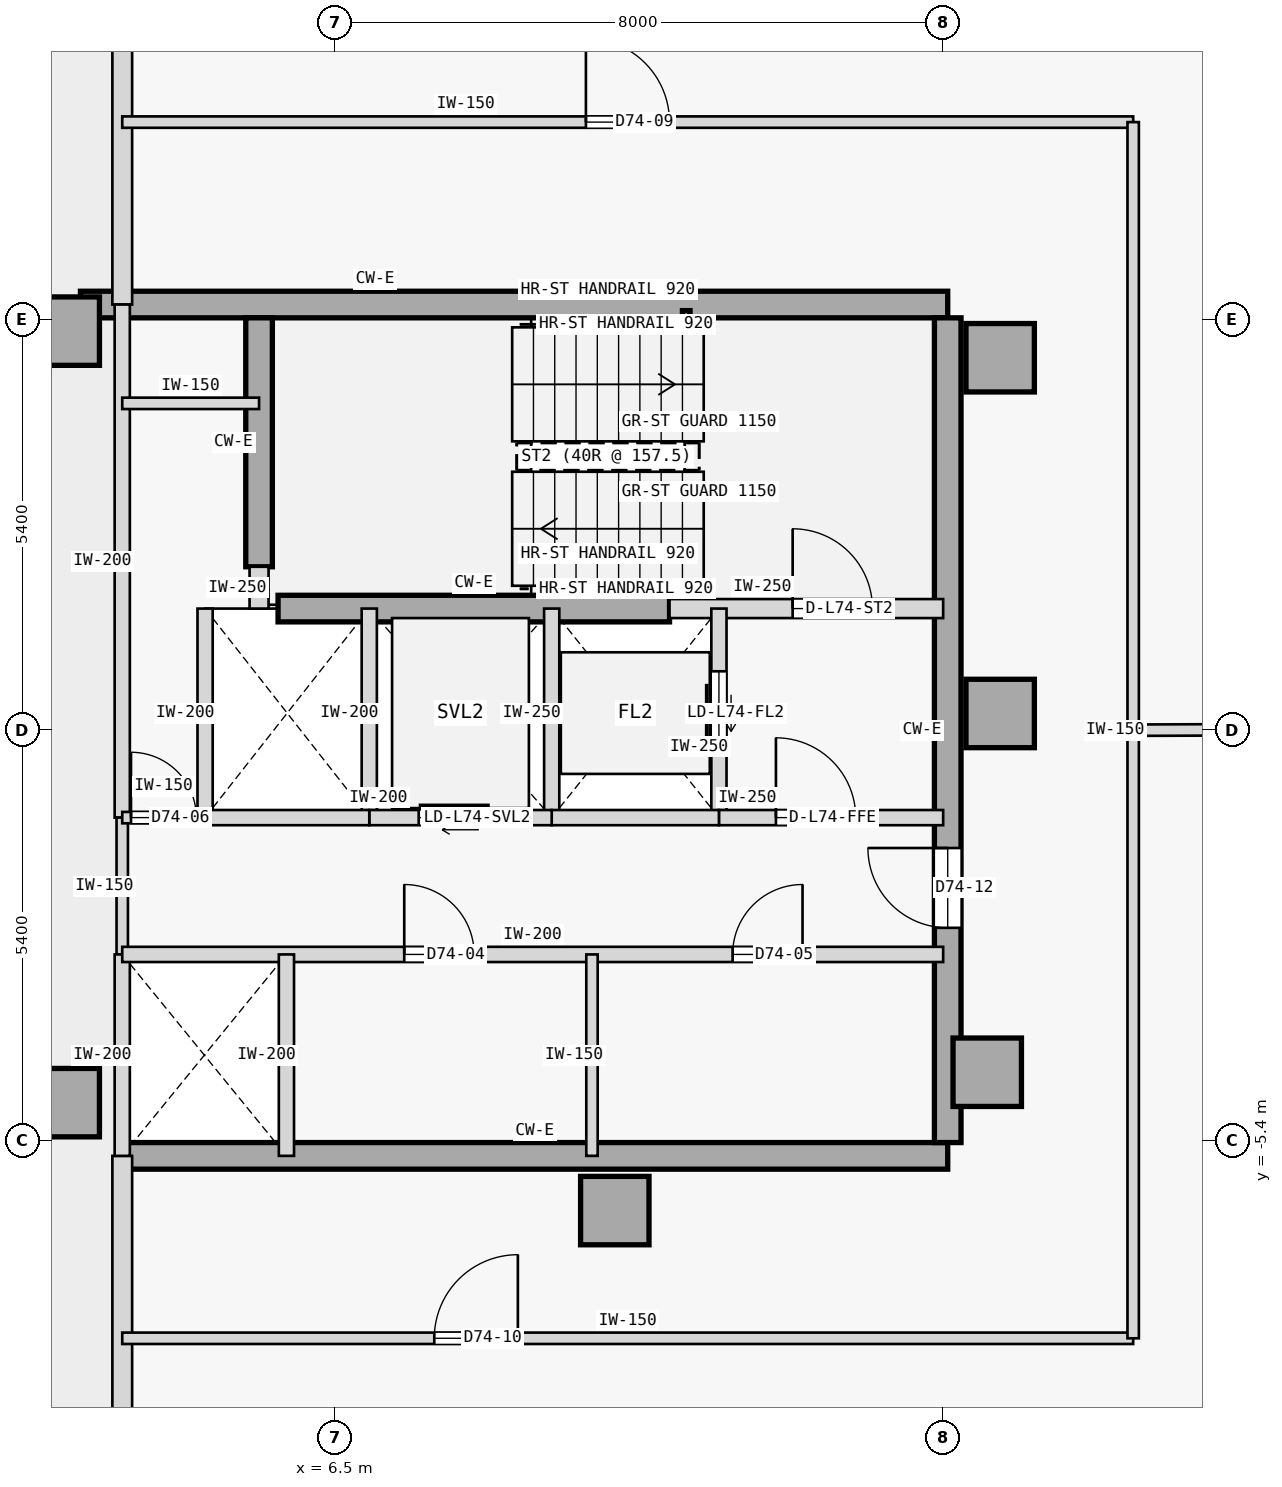
"""IFC4 building model, lengths in metres.
Left out: names, types, materials, properties, quantities, classifications, styles, units other than length and angle.
Written with IfcOpenShell. Run it as: python <this file> out.ifc"""

import sys

from ifc_helpers import new_model, si_unit, direction, frame, frame_2d, origin, origin_2d, place, context, subcontext, project, spatial, rectangle, hollow_rectangle, extrude, element, fill, save


model = new_model("IFC4")
c1 = context("Model", 3, precision=1e-05, world=origin(), true_north=direction((0.0, 1.0)))
c2 = subcontext(c1, "Body", "Model", "MODEL_VIEW")
j1 = project(units=[si_unit("LENGTHUNIT", "METRE"), si_unit("PLANEANGLEUNIT", "RADIAN")], contexts=[c1])
p1 = place(None, origin())
s1 = spatial("IfcSite", under=j1, at=p1, CompositionType="ELEMENT")
p2 = place(p1, origin())
s2 = spatial("IfcBuilding", under=s1, at=p2, CompositionType="ELEMENT")
p3 = place(p2, frame((0.0, 0.0, 275.6)))
s3 = spatial("IfcBuildingStorey", under=s2, at=p3, CompositionType="ELEMENT", Elevation=275.6)
for number, where, z_axis, x_axis in (
    (1, (15.25, 4.9, 0.0), (0.0, 0.0, 1.0), (1.0, 0.0, 0.0)),
    (2, (15.25, 0.22, 0.0), (0.0, 0.0, 1.0), (1.0, 0.0, 0.0)),
    (3, (15.08, -4.5, 0.0), (0.0, 0.0, 1.0), (1.0, 0.0, 0.0)),
    (4, (10.18, -6.32, 0.0), (0.0, 0.0, 1.0), (1.0, 0.0, 0.0)),
    (5, (2.95, -4.9, 0.0), (0.0, 0.0, 1.0), (1.0, 0.0, 0.0)),
    (6, (2.95, 5.25, 0.0), (0.0, 0.0, 1.0), (1.0, 0.0, 0.0)),
):
    element("IfcColumn", number, at=place(p3, frame(where, z_axis=z_axis, x_axis=x_axis)), inside=s3, PredefinedType="COLUMN", context=c2, shape_type="SweptSolid", body=[
        extrude(rectangle(XDim=0.9, YDim=0.9, at=origin_2d()), origin(), (0.0, 0.0, 1.0), 6.3),
    ])
p4 = place(p3, frame((3.15, 5.6, 0.0), z_axis=(0.0, 0.0, 1.0), x_axis=(1.0, 0.0, 0.0)))
e7 = element("IfcWall", 7, at=p4, inside=s3, PredefinedType="SHEAR", context=c2, shape_type="SweptSolid", body=[
    extrude(rectangle(XDim=11.41, YDim=0.35, at=frame_2d((5.705, 0.0))), origin(), (0.0, 0.0, 1.0), 6.075),
])
p5 = place(p3, frame((3.7, -5.6, 0.0), z_axis=(0.0, 0.0, 1.0), x_axis=(1.0, 0.0, 0.0)))
e8 = element("IfcWall", 8, at=p5, inside=s3, PredefinedType="SHEAR", context=c2, shape_type="SweptSolid", body=[
    extrude(rectangle(XDim=10.86, YDim=0.35, at=frame_2d((5.43, 0.0))), origin(), (0.0, 0.0, 1.0), 6.075),
])
p6 = place(p3, frame((14.56, -5.425, 0.0), z_axis=(0.0, 0.0, 1.0), x_axis=(0.0, 1.0, 0.0)))
e9 = element("IfcWall", 9, at=p6, inside=s3, PredefinedType="SHEAR", context=c2, shape_type="SweptSolid", body=[
    extrude(rectangle(XDim=10.85, YDim=0.35, at=frame_2d((5.425, 0.0))), origin(), (0.0, 0.0, 1.0), 6.075),
])
p7 = place(p6, frame((2.825, 0.0, 0.0)))
e10 = element("IfcOpeningElement", 10, at=p7, cuts=e9, PredefinedType="OPENING", context=c2, shape_type="SweptSolid", body=[
    extrude(rectangle(XDim=1.05, YDim=2.15, at=frame_2d((0.525, 1.075))), frame((0.0, 0.185, 0.0), z_axis=(0.0, -1.0, 0.0), x_axis=(1.0, 0.0, 0.0)), (0.0, 0.0, 1.0), 0.37),
])
p8 = place(p3, frame((5.5, 2.15, 0.0), z_axis=(0.0, 0.0, 1.0), x_axis=(0.0, 1.0, 0.0)))
e11 = element("IfcWall", 11, at=p8, inside=s3, PredefinedType="SHEAR", context=c2, shape_type="SweptSolid", body=[
    extrude(rectangle(XDim=3.275, YDim=0.35, at=frame_2d((1.638, 0.0))), origin(), (0.0, 0.0, 1.0), 6.075),
])
p9 = place(p3, frame((5.75, 1.6, 0.0), z_axis=(0.0, 0.0, 1.0), x_axis=(1.0, 0.0, 0.0)))
e12 = element("IfcWall", 12, at=p9, inside=s3, PredefinedType="SHEAR", context=c2, shape_type="SweptSolid", body=[
    extrude(rectangle(XDim=5.15, YDim=0.35, at=frame_2d((2.575, 0.0))), origin(), (0.0, 0.0, 1.0), 6.075),
])
p10 = place(p3, frame((11.12, 5.42, 0.0), z_axis=(0.0, 0.0, 1.0), x_axis=(1.0, 0.0, 0.0)))
e13 = element("IfcColumn", 13, at=p10, inside=s3, PredefinedType="COLUMN", context=c2, shape_type="SweptSolid", body=[
    extrude(hollow_rectangle(XDim=0.1, YDim=0.2, WallThickness=0.008, at=origin_2d()), origin(), (0.0, 0.0, 1.0), 6.3),
])
p11 = place(p3, frame((3.7, -22.0, 0.0), z_axis=(0.0, 0.0, 1.0), x_axis=(0.0, 1.0, 0.0)))
e14 = element("IfcWall", 14, at=p11, inside=s3, PredefinedType="STANDARD", context=c2, shape_type="SweptSolid", body=[
    extrude(rectangle(XDim=16.4, YDim=0.26, at=frame_2d((8.2, 0.0))), origin(), (0.0, 0.0, 1.0), 5.625),
])
p12 = place(p11, frame((7.65, 0.0, 0.0)))
e15 = element("IfcOpeningElement", 15, at=p12, cuts=e14, PredefinedType="OPENING", context=c2, shape_type="SweptSolid", body=[
    extrude(rectangle(XDim=1.1, YDim=2.2, at=frame_2d((0.55, 1.1))), frame((0.0, 0.14, 0.0), z_axis=(0.0, -1.0, 0.0), x_axis=(1.0, 0.0, 0.0)), (0.0, 0.0, 1.0), 0.28),
])
p13 = place(p3, frame((3.7, 5.6, 0.0), z_axis=(0.0, 0.0, 1.0), x_axis=(0.0, 1.0, 0.0)))
e16 = element("IfcWall", 16, at=p13, inside=s3, PredefinedType="STANDARD", context=c2, shape_type="SweptSolid", body=[
    extrude(rectangle(XDim=13.377, YDim=0.26, at=frame_2d((6.688, 0.0))), origin(), (0.0, 0.0, 1.0), 5.625),
])
p14 = place(p3, frame((10.9, 1.6, 0.0), z_axis=(0.0, 0.0, 1.0), x_axis=(1.0, 0.0, 0.0)))
e17 = element("IfcWall", 17, at=p14, inside=s3, PredefinedType="STANDARD", context=c2, shape_type="SweptSolid", body=[
    extrude(rectangle(XDim=3.6, YDim=0.25, at=frame_2d((1.8, 0.0))), origin(), (0.0, 0.0, 1.0), 6.075),
])
p15 = place(p14, frame((1.62, 0.0, 0.0)))
e18 = element("IfcOpeningElement", 18, at=p15, cuts=e17, PredefinedType="OPENING", context=c2, shape_type="SweptSolid", body=[
    extrude(rectangle(XDim=1.05, YDim=2.15, at=frame_2d((0.525, 1.075))), frame((0.0, 0.135, 0.0), z_axis=(0.0, -1.0, 0.0), x_axis=(1.0, 0.0, 0.0)), (0.0, 0.0, 1.0), 0.27),
])
p16 = place(p3, frame((5.5, 1.6, 0.0), z_axis=(0.0, 0.0, 1.0), x_axis=(0.0, 1.0, 0.0)))
e19 = element("IfcWall", 19, at=p16, inside=s3, PredefinedType="STANDARD", context=c2, shape_type="SweptSolid", body=[
    extrude(rectangle(XDim=0.55, YDim=0.25, at=frame_2d((0.275, 0.0))), origin(), (0.0, 0.0, 1.0), 6.075),
])
p17 = place(p3, frame((3.7, -1.15, 0.0), z_axis=(0.0, 0.0, 1.0), x_axis=(0.0, 1.0, 0.0)))
e20 = element("IfcWall", 20, at=p17, inside=s3, PredefinedType="STANDARD", context=c2, shape_type="SweptSolid", body=[
    extrude(rectangle(XDim=6.75, YDim=0.2, at=frame_2d((3.375, 0.0))), origin(), (0.0, 0.0, 1.0), 6.075),
])
p18 = place(p3, frame((3.7, -2.95, 0.0), z_axis=(0.0, 0.0, 1.0), x_axis=(0.0, 1.0, 0.0)))
e21 = element("IfcWall", 21, at=p18, inside=s3, PredefinedType="PARTITIONING", context=c2, shape_type="SweptSolid", body=[
    extrude(rectangle(XDim=1.8, YDim=0.15, at=frame_2d((0.9, 0.0))), origin(), (0.0, 0.0, 1.0), 6.075),
])
p19 = place(p3, frame((3.7, -5.6, 0.0), z_axis=(0.0, 0.0, 1.0), x_axis=(0.0, 1.0, 0.0)))
e22 = element("IfcWall", 22, at=p19, inside=s3, PredefinedType="STANDARD", context=c2, shape_type="SweptSolid", body=[
    extrude(rectangle(XDim=2.65, YDim=0.2, at=frame_2d((1.325, 0.0))), origin(), (0.0, 0.0, 1.0), 6.075),
])
p20 = place(p3, frame((11.55, -1.15, 0.0), z_axis=(0.0, 0.0, 1.0), x_axis=(0.0, 1.0, 0.0)))
e23 = element("IfcWall", 23, at=p20, inside=s3, PredefinedType="STANDARD", context=c2, shape_type="SweptSolid", body=[
    extrude(rectangle(XDim=2.75, YDim=0.2, at=frame_2d((1.375, 0.0))), origin(), (0.0, 0.0, 1.0), 6.075),
])
p21 = place(p20, frame((0.825, 0.0, 0.0)))
e24 = element("IfcOpeningElement", 24, at=p21, cuts=e23, PredefinedType="OPENING", context=c2, shape_type="SweptSolid", body=[
    extrude(rectangle(XDim=1.1, YDim=2.15, at=frame_2d((0.55, 1.075))), frame((0.0, 0.11, 0.0), z_axis=(0.0, -1.0, 0.0), x_axis=(1.0, 0.0, 0.0)), (0.0, 0.0, 1.0), 0.22),
])
p22 = place(p3, frame((9.35, -1.15, 0.0), z_axis=(0.0, 0.0, 1.0), x_axis=(0.0, 1.0, 0.0)))
e25 = element("IfcWall", 25, at=p22, inside=s3, PredefinedType="STANDARD", context=c2, shape_type="SweptSolid", body=[
    extrude(rectangle(XDim=2.75, YDim=0.2, at=frame_2d((1.375, 0.0))), origin(), (0.0, 0.0, 1.0), 6.075),
])
p23 = place(p3, frame((11.55, -1.15, 0.0), z_axis=(0.0, 0.0, 1.0), x_axis=(1.0, 0.0, 0.0)))
e26 = element("IfcWall", 26, at=p23, inside=s3, PredefinedType="STANDARD", context=c2, shape_type="SweptSolid", body=[
    extrude(rectangle(XDim=2.95, YDim=0.2, at=frame_2d((1.475, 0.0))), origin(), (0.0, 0.0, 1.0), 6.075),
])
p24 = place(p23, frame((0.75, 0.0, 0.0)))
e27 = element("IfcOpeningElement", 27, at=p24, cuts=e26, PredefinedType="OPENING", context=c2, shape_type="SweptSolid", body=[
    extrude(rectangle(XDim=1.05, YDim=2.18, at=frame_2d((0.525, 1.09))), frame((0.0, 0.11, 0.0), z_axis=(0.0, -1.0, 0.0), x_axis=(1.0, 0.0, 0.0)), (0.0, 0.0, 1.0), 0.22),
])
p25 = place(p3, frame((9.35, -1.15, 0.0), z_axis=(0.0, 0.0, 1.0), x_axis=(1.0, 0.0, 0.0)))
e28 = element("IfcWall", 28, at=p25, inside=s3, PredefinedType="STANDARD", context=c2, shape_type="SweptSolid", body=[
    extrude(rectangle(XDim=2.2, YDim=0.2, at=frame_2d((1.1, 0.0))), origin(), (0.0, 0.0, 1.0), 6.075),
])
p26 = place(p3, frame((6.95, -1.15, 0.0), z_axis=(0.0, 0.0, 1.0), x_axis=(0.0, 1.0, 0.0)))
e29 = element("IfcWall", 29, at=p26, inside=s3, PredefinedType="STANDARD", context=c2, shape_type="SweptSolid", body=[
    extrude(rectangle(XDim=2.75, YDim=0.2, at=frame_2d((1.375, 0.0))), origin(), (0.0, 0.0, 1.0), 6.075),
])
p27 = place(p3, frame((6.95, -1.15, 0.0), z_axis=(0.0, 0.0, 1.0), x_axis=(1.0, 0.0, 0.0)))
e30 = element("IfcWall", 30, at=p27, inside=s3, PredefinedType="STANDARD", context=c2, shape_type="SweptSolid", body=[
    extrude(rectangle(XDim=2.4, YDim=0.2, at=frame_2d((1.2, 0.0))), origin(), (0.0, 0.0, 1.0), 6.075),
])
p28 = place(p27, frame((0.65, 0.0, 0.0)))
e31 = element("IfcOpeningElement", 31, at=p28, cuts=e30, PredefinedType="OPENING", context=c2, shape_type="SweptSolid", body=[
    extrude(rectangle(XDim=1.1, YDim=2.15, at=frame_2d((0.55, 1.075))), frame((0.0, 0.11, 0.0), z_axis=(0.0, -1.0, 0.0), x_axis=(1.0, 0.0, 0.0)), (0.0, 0.0, 1.0), 0.22),
])
p29 = place(p3, frame((4.79, -1.15, 0.0), z_axis=(0.0, 0.0, 1.0), x_axis=(0.0, 1.0, 0.0)))
e32 = element("IfcWall", 32, at=p29, inside=s3, PredefinedType="STANDARD", context=c2, shape_type="SweptSolid", body=[
    extrude(rectangle(XDim=2.75, YDim=0.2, at=frame_2d((1.375, 0.0))), origin(), (0.0, 0.0, 1.0), 6.075),
])
p30 = place(p3, frame((4.79, -1.15, 0.0), z_axis=(0.0, 0.0, 1.0), x_axis=(1.0, 0.0, 0.0)))
e33 = element("IfcWall", 33, at=p30, inside=s3, PredefinedType="STANDARD", context=c2, shape_type="SweptSolid", body=[
    extrude(rectangle(XDim=2.16, YDim=0.2, at=frame_2d((1.08, 0.0))), origin(), (0.0, 0.0, 1.0), 6.075),
])
p31 = place(p3, frame((3.7, -1.15, 0.0), z_axis=(0.0, 0.0, 1.0), x_axis=(1.0, 0.0, 0.0)))
e34 = element("IfcWall", 34, at=p31, inside=s3, PredefinedType="PARTITIONING", context=c2, shape_type="SweptSolid", body=[
    extrude(rectangle(XDim=1.09, YDim=0.15, at=frame_2d((0.545, 0.0))), origin(), (0.0, 0.0, 1.0), 6.075),
])
p32 = place(p31, frame((0.115, 0.0, 0.0)))
e35 = element("IfcOpeningElement", 35, at=p32, cuts=e34, PredefinedType="OPENING", context=c2, shape_type="SweptSolid", body=[
    extrude(rectangle(XDim=0.86, YDim=2.15, at=frame_2d((0.43, 1.075))), frame((0.0, 0.085, 0.0), z_axis=(0.0, -1.0, 0.0), x_axis=(1.0, 0.0, 0.0)), (0.0, 0.0, 1.0), 0.17),
])
p33 = place(p3, frame((3.7, -2.95, 0.0), z_axis=(0.0, 0.0, 1.0), x_axis=(1.0, 0.0, 0.0)))
e36 = element("IfcWall", 36, at=p33, inside=s3, PredefinedType="STANDARD", context=c2, shape_type="SweptSolid", body=[
    extrude(rectangle(XDim=10.8, YDim=0.2, at=frame_2d((5.4, 0.0))), origin(), (0.0, 0.0, 1.0), 6.075),
])
p34 = place(p33, frame((3.71, 0.0, 0.0)))
e37 = element("IfcOpeningElement", 37, at=p34, cuts=e36, PredefinedType="OPENING", context=c2, shape_type="SweptSolid", body=[
    extrude(rectangle(XDim=0.92, YDim=2.15, at=frame_2d((0.46, 1.075))), frame((0.0, 0.11, 0.0), z_axis=(0.0, -1.0, 0.0), x_axis=(1.0, 0.0, 0.0)), (0.0, 0.0, 1.0), 0.22),
])
p35 = place(p33, frame((8.03, 0.0, 0.0)))
e38 = element("IfcOpeningElement", 38, at=p35, cuts=e36, PredefinedType="OPENING", context=c2, shape_type="SweptSolid", body=[
    extrude(rectangle(XDim=0.92, YDim=2.15, at=frame_2d((0.46, 1.075))), frame((0.0, 0.11, 0.0), z_axis=(0.0, -1.0, 0.0), x_axis=(1.0, 0.0, 0.0)), (0.0, 0.0, 1.0), 0.22),
])
p36 = place(p3, frame((5.86, -5.6, 0.0), z_axis=(0.0, 0.0, 1.0), x_axis=(0.0, 1.0, 0.0)))
e39 = element("IfcWall", 39, at=p36, inside=s3, PredefinedType="STANDARD", context=c2, shape_type="SweptSolid", body=[
    extrude(rectangle(XDim=2.65, YDim=0.2, at=frame_2d((1.325, 0.0))), origin(), (0.0, 0.0, 1.0), 6.075),
])
p37 = place(p3, frame((9.88, -5.6, 0.0), z_axis=(0.0, 0.0, 1.0), x_axis=(0.0, 1.0, 0.0)))
e40 = element("IfcWall", 40, at=p37, inside=s3, PredefinedType="PARTITIONING", context=c2, shape_type="SweptSolid", body=[
    extrude(rectangle(XDim=2.65, YDim=0.15, at=frame_2d((1.325, 0.0))), origin(), (0.0, 0.0, 1.0), 6.075),
])
p38 = place(p3, frame((3.7, 4.3, 0.0), z_axis=(0.0, 0.0, 1.0), x_axis=(1.0, 0.0, 0.0)))
e41 = element("IfcWall", 41, at=p38, inside=s3, PredefinedType="PARTITIONING", context=c2, shape_type="SweptSolid", body=[
    extrude(rectangle(XDim=1.8, YDim=0.15, at=frame_2d((0.9, 0.0))), origin(), (0.0, 0.0, 1.0), 6.075),
])
p39 = place(p3, frame((3.7, 8.0, 0.0), z_axis=(0.0, 0.0, 1.0), x_axis=(1.0, 0.0, 0.0)))
e42 = element("IfcWall", 42, at=p39, inside=s3, PredefinedType="PARTITIONING", context=c2, shape_type="SweptSolid", body=[
    extrude(rectangle(XDim=13.3, YDim=0.15, at=frame_2d((6.65, 0.0))), origin(), (0.0, 0.0, 1.0), 6.075),
])
p40 = place(p39, frame((6.1, 0.0, 0.0)))
e43 = element("IfcOpeningElement", 43, at=p40, cuts=e42, PredefinedType="OPENING", context=c2, shape_type="SweptSolid", body=[
    extrude(rectangle(XDim=1.1, YDim=2.15, at=frame_2d((0.55, 1.075))), frame((0.0, 0.085, 0.0), z_axis=(0.0, -1.0, 0.0), x_axis=(1.0, 0.0, 0.0)), (0.0, 0.0, 1.0), 0.17),
])
p41 = place(p3, frame((17.0, 0.0, 0.0), z_axis=(0.0, 0.0, 1.0), x_axis=(0.0, 1.0, 0.0)))
e44 = element("IfcWall", 44, at=p41, inside=s3, PredefinedType="PARTITIONING", context=c2, shape_type="SweptSolid", body=[
    extrude(rectangle(XDim=8.0, YDim=0.15, at=frame_2d((4.0, 0.0))), origin(), (0.0, 0.0, 1.0), 6.075),
])
p42 = place(p3, frame((3.7, -8.0, 0.0), z_axis=(0.0, 0.0, 1.0), x_axis=(1.0, 0.0, 0.0)))
e45 = element("IfcWall", 45, at=p42, inside=s3, PredefinedType="PARTITIONING", context=c2, shape_type="SweptSolid", body=[
    extrude(rectangle(XDim=13.3, YDim=0.15, at=frame_2d((6.65, 0.0))), origin(), (0.0, 0.0, 1.0), 6.075),
])
p43 = place(p42, frame((4.105, 0.0, 0.0)))
e46 = element("IfcOpeningElement", 46, at=p43, cuts=e45, PredefinedType="OPENING", context=c2, shape_type="SweptSolid", body=[
    extrude(rectangle(XDim=1.1, YDim=2.15, at=frame_2d((0.55, 1.075))), frame((0.0, 0.085, 0.0), z_axis=(0.0, -1.0, 0.0), x_axis=(1.0, 0.0, 0.0)), (0.0, 0.0, 1.0), 0.17),
])
p44 = place(p3, frame((17.0, -8.0, 0.0), z_axis=(0.0, 0.0, 1.0), x_axis=(0.0, 1.0, 0.0)))
e47 = element("IfcWall", 47, at=p44, inside=s3, PredefinedType="PARTITIONING", context=c2, shape_type="SweptSolid", body=[
    extrude(rectangle(XDim=8.0, YDim=0.15, at=frame_2d((4.0, 0.0))), origin(), (0.0, 0.0, 1.0), 6.075),
])
p45 = place(p3, frame((17.0, 0.0, 0.0), z_axis=(0.0, 0.0, 1.0), x_axis=(0.999992186475, 0.003953098542, 0.0)))
e48 = element("IfcWall", 48, at=p45, inside=s3, PredefinedType="PARTITIONING", context=c2, shape_type="SweptSolid", body=[
    extrude(rectangle(XDim=15.501, YDim=0.15, at=frame_2d((7.751, 0.0))), origin(), (0.0, 0.0, 1.0), 6.075),
])
p46 = place(p15, origin())
e49 = element("IfcDoor", 49, at=p46, inside=s3, OperationType="SINGLE_SWING_LEFT", PredefinedType="DOOR", context=c2, shape_type="SweptSolid", body=[
    extrude(rectangle(XDim=1.05, YDim=2.15, at=frame_2d((0.525, 1.075))), frame((0.0, 0.025, 0.0), z_axis=(0.0, -1.0, 0.0), x_axis=(1.0, 0.0, 0.0)), (0.0, 0.0, 1.0), 0.05),
])
fill(e18, e49)
p47 = place(p24, origin())
e50 = element("IfcDoor", 50, at=p47, inside=s3, OperationType="SINGLE_SWING_LEFT", PredefinedType="DOOR", context=c2, shape_type="SweptSolid", body=[
    extrude(rectangle(XDim=1.05, YDim=2.18, at=frame_2d((0.525, 1.09))), frame((0.0, 0.025, 0.0), z_axis=(0.0, -1.0, 0.0), x_axis=(1.0, 0.0, 0.0)), (0.0, 0.0, 1.0), 0.05),
])
fill(e27, e50)
p48 = place(p21, origin())
e51 = element("IfcDoor", 51, at=p48, inside=s3, OperationType="SLIDING_TO_RIGHT", PredefinedType="DOOR", context=c2, shape_type="SweptSolid", body=[
    extrude(rectangle(XDim=1.1, YDim=2.15, at=frame_2d((0.55, 1.075))), frame((0.0, 0.025, 0.0), z_axis=(0.0, -1.0, 0.0), x_axis=(1.0, 0.0, 0.0)), (0.0, 0.0, 1.0), 0.05),
])
fill(e24, e51)
p49 = place(p28, origin())
e52 = element("IfcDoor", 52, at=p49, inside=s3, OperationType="SLIDING_TO_RIGHT", PredefinedType="DOOR", context=c2, shape_type="SweptSolid", body=[
    extrude(rectangle(XDim=1.1, YDim=2.15, at=frame_2d((0.55, 1.075))), frame((0.0, 0.025, 0.0), z_axis=(0.0, -1.0, 0.0), x_axis=(1.0, 0.0, 0.0)), (0.0, 0.0, 1.0), 0.05),
])
fill(e31, e52)
p50 = place(p34, origin())
e53 = element("IfcDoor", 53, at=p50, inside=s3, OperationType="SINGLE_SWING_LEFT", PredefinedType="DOOR", context=c2, shape_type="SweptSolid", body=[
    extrude(rectangle(XDim=0.92, YDim=2.15, at=frame_2d((0.46, 1.075))), frame((0.0, 0.025, 0.0), z_axis=(0.0, -1.0, 0.0), x_axis=(1.0, 0.0, 0.0)), (0.0, 0.0, 1.0), 0.05),
])
fill(e37, e53)
p51 = place(p35, origin())
e54 = element("IfcDoor", 54, at=p51, inside=s3, OperationType="SINGLE_SWING_RIGHT", PredefinedType="DOOR", context=c2, shape_type="SweptSolid", body=[
    extrude(rectangle(XDim=0.92, YDim=2.15, at=frame_2d((0.46, 1.075))), frame((0.0, 0.025, 0.0), z_axis=(0.0, -1.0, 0.0), x_axis=(1.0, 0.0, 0.0)), (0.0, 0.0, 1.0), 0.05),
])
fill(e38, e54)
p52 = place(p32, origin())
e55 = element("IfcDoor", 55, at=p52, inside=s3, OperationType="SINGLE_SWING_LEFT", PredefinedType="DOOR", context=c2, shape_type="SweptSolid", body=[
    extrude(rectangle(XDim=0.86, YDim=2.15, at=frame_2d((0.43, 1.075))), frame((0.0, 0.025, 0.0), z_axis=(0.0, -1.0, 0.0), x_axis=(1.0, 0.0, 0.0)), (0.0, 0.0, 1.0), 0.05),
])
fill(e35, e55)
p53 = place(p40, origin())
e56 = element("IfcDoor", 56, at=p53, inside=s3, OperationType="SINGLE_SWING_LEFT", PredefinedType="DOOR", context=c2, shape_type="SweptSolid", body=[
    extrude(rectangle(XDim=1.1, YDim=2.15, at=frame_2d((0.55, 1.075))), frame((0.0, 0.025, 0.0), z_axis=(0.0, -1.0, 0.0), x_axis=(1.0, 0.0, 0.0)), (0.0, 0.0, 1.0), 0.05),
])
fill(e43, e56)
p54 = place(p43, origin())
e57 = element("IfcDoor", 57, at=p54, inside=s3, OperationType="SINGLE_SWING_RIGHT", PredefinedType="DOOR", context=c2, shape_type="SweptSolid", body=[
    extrude(rectangle(XDim=1.1, YDim=2.15, at=frame_2d((0.55, 1.075))), frame((0.0, 0.025, 0.0), z_axis=(0.0, -1.0, 0.0), x_axis=(1.0, 0.0, 0.0)), (0.0, 0.0, 1.0), 0.05),
])
fill(e46, e57)
p55 = place(p7, origin())
e58 = element("IfcDoor", 58, at=p55, inside=s3, OperationType="SINGLE_SWING_RIGHT", PredefinedType="DOOR", context=c2, shape_type="SweptSolid", body=[
    extrude(rectangle(XDim=1.05, YDim=2.15, at=frame_2d((0.525, 1.075))), frame((0.0, 0.025, 0.0), z_axis=(0.0, -1.0, 0.0), x_axis=(1.0, 0.0, 0.0)), (0.0, 0.0, 1.0), 0.05),
])
fill(e10, e58)
save(model, sys.argv[1])
